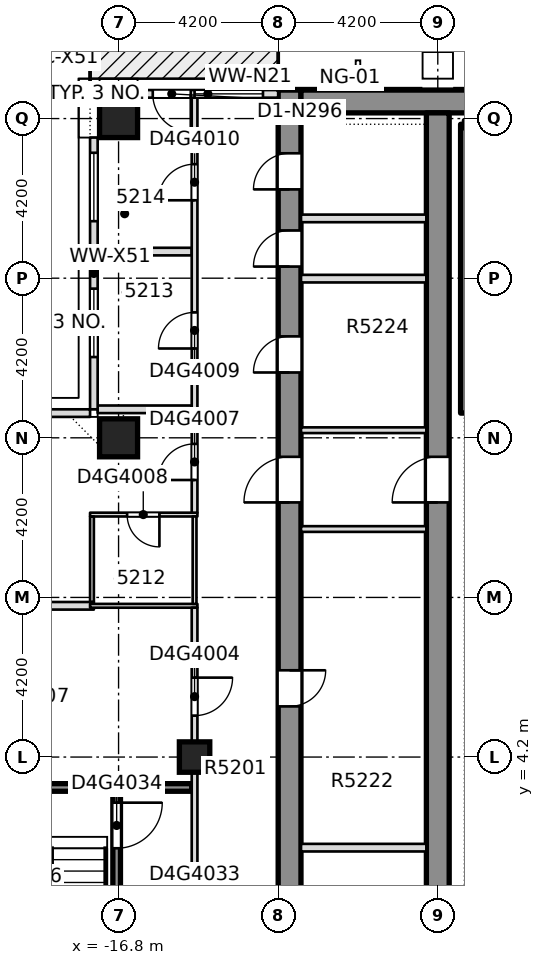
"""IFC4 building model, lengths in metres.
Left out: names, types, materials, properties, quantities, classifications, styles, units other than length and angle.
Written with IfcOpenShell. Run it as: python <this file> out.ifc"""

import sys

from ifc_helpers import new_model, si_unit, direction, frame, frame_2d, origin, origin_2d, place, context, subcontext, project, spatial, rectangle, extrude, element, fill, save


model = new_model("IFC4")
c1 = context("Model", 3, precision=1e-05, world=origin(), true_north=direction((0.0, 1.0)))
c2 = subcontext(c1, "Body", "Model", "MODEL_VIEW")
j1 = project(units=[si_unit("LENGTHUNIT", "METRE"), si_unit("PLANEANGLEUNIT", "RADIAN")], contexts=[c1])
p1 = place(None, origin())
s1 = spatial("IfcSite", under=j1, at=p1, CompositionType="ELEMENT")
p2 = place(p1, origin())
s2 = spatial("IfcBuilding", under=s1, at=p2, CompositionType="ELEMENT")
p3 = place(p2, frame((0.0, 0.0, 199.7)))
s3 = spatial("IfcBuildingStorey", under=s2, at=p3, CompositionType="ELEMENT", Elevation=199.7)
p4 = place(p3, frame((-12.3, -8.4, -0.4), z_axis=(0.0, 0.0, 1.0), x_axis=(0.0, 1.0, 0.0)))
e1 = element("IfcWall", 1, at=p4, inside=s3, PredefinedType="SHEAR", context=c2, shape_type="SweptSolid", body=[
    extrude(rectangle(XDim=30.15, YDim=0.6, at=frame_2d((15.075, 0.0))), origin(), (0.0, 0.0, 1.0), 3.45),
])
p5 = place(p4, frame((5.083, 0.0, 0.4)))
e2 = element("IfcOpeningElement", 2, at=p5, cuts=e1, PredefinedType="OPENING", context=c2, shape_type="SweptSolid", body=[
    extrude(rectangle(XDim=0.95, YDim=2.1, at=frame_2d((0.475, 1.05))), frame((0.0, 0.31, 0.0), z_axis=(0.0, -1.0, 0.0), x_axis=(1.0, 0.0, 0.0)), (0.0, 0.0, 1.0), 0.62),
])
p6 = place(p4, frame((13.933, 0.0, 0.4)))
e3 = element("IfcOpeningElement", 3, at=p6, cuts=e1, PredefinedType="OPENING", context=c2, shape_type="SweptSolid", body=[
    extrude(rectangle(XDim=0.95, YDim=2.1, at=frame_2d((0.475, 1.05))), frame((0.0, 0.31, 0.0), z_axis=(0.0, -1.0, 0.0), x_axis=(1.0, 0.0, 0.0)), (0.0, 0.0, 1.0), 0.62),
])
p7 = place(p4, frame((22.719, 0.0, 0.4)))
e4 = element("IfcOpeningElement", 4, at=p7, cuts=e1, PredefinedType="OPENING", context=c2, shape_type="SweptSolid", body=[
    extrude(rectangle(XDim=0.95, YDim=2.1, at=frame_2d((0.475, 1.05))), frame((0.0, 0.31, 0.0), z_axis=(0.0, -1.0, 0.0), x_axis=(1.0, 0.0, 0.0)), (0.0, 0.0, 1.0), 0.62),
])
p8 = place(p4, frame((25.506, 0.0, 0.4)))
e5 = element("IfcOpeningElement", 5, at=p8, cuts=e1, PredefinedType="OPENING", context=c2, shape_type="SweptSolid", body=[
    extrude(rectangle(XDim=0.95, YDim=2.1, at=frame_2d((0.475, 1.05))), frame((0.0, 0.31, 0.0), z_axis=(0.0, -1.0, 0.0), x_axis=(1.0, 0.0, 0.0)), (0.0, 0.0, 1.0), 0.62),
])
p9 = place(p4, frame((27.537, 0.0, 0.4)))
e6 = element("IfcOpeningElement", 6, at=p9, cuts=e1, PredefinedType="OPENING", context=c2, shape_type="SweptSolid", body=[
    extrude(rectangle(XDim=0.95, YDim=2.1, at=frame_2d((0.475, 1.05))), frame((0.0, 0.31, 0.0), z_axis=(0.0, -1.0, 0.0), x_axis=(1.0, 0.0, 0.0)), (0.0, 0.0, 1.0), 0.62),
])
p10 = place(p4, frame((19.3, 0.0, 0.4)))
e7 = element("IfcOpeningElement", 7, at=p10, cuts=e1, PredefinedType="OPENING", context=c2, shape_type="SweptSolid", body=[
    extrude(rectangle(XDim=1.2, YDim=2.1, at=frame_2d((0.6, 1.05))), frame((0.0, 0.31, 0.0), z_axis=(0.0, -1.0, 0.0), x_axis=(1.0, 0.0, 0.0)), (0.0, 0.0, 1.0), 0.62),
])
p11 = place(p3, frame((-12.0, 21.45, -0.4), z_axis=(0.0, 0.0, 1.0), x_axis=(1.0, 0.0, 0.0)))
e8 = element("IfcWall", 8, at=p11, inside=s3, PredefinedType="SHEAR", context=c2, shape_type="SweptSolid", body=[
    extrude(rectangle(XDim=24.0, YDim=0.6, at=frame_2d((12.0, 0.0))), origin(), (0.0, 0.0, 1.0), 3.45),
])
p12 = place(p3, frame((-8.4, -7.8, -0.4), z_axis=(0.0, 0.0, 1.0), x_axis=(0.0, 1.0, 0.0)))
e9 = element("IfcWall", 9, at=p12, inside=s3, PredefinedType="SHEAR", context=c2, shape_type="SweptSolid", body=[
    extrude(rectangle(XDim=28.95, YDim=0.6, at=frame_2d((14.475, 0.0))), origin(), (0.0, 0.0, 1.0), 3.45),
])
p13 = place(p12, frame((18.7, 0.0, 0.4)))
e10 = element("IfcOpeningElement", 10, at=p13, cuts=e9, PredefinedType="OPENING", context=c2, shape_type="SweptSolid", body=[
    extrude(rectangle(XDim=1.2, YDim=2.1, at=frame_2d((0.6, 1.05))), frame((0.0, 0.31, 0.0), z_axis=(0.0, -1.0, 0.0), x_axis=(1.0, 0.0, 0.0)), (0.0, 0.0, 1.0), 0.62),
])
for number, where, z_axis, x_axis in (
    (11, (-16.8, 12.6, -0.4), (0.0, 0.0, 1.0), (1.0, 0.0, 0.0)),
    (12, (-16.8, 21.0, -0.4), (0.0, 0.0, 1.0), (1.0, 0.0, 0.0)),
):
    element("IfcColumn", number, at=place(p3, frame(where, z_axis=z_axis, x_axis=x_axis)), inside=s3, PredefinedType="COLUMN", context=c2, shape_type="SweptSolid", body=[
        extrude(rectangle(XDim=1.0, YDim=1.0, at=origin_2d()), origin(), (0.0, 0.0, 1.0), 3.45),
    ])
p14 = place(p3, frame((-14.8, 4.2, -0.4), z_axis=(0.0, 0.0, 1.0), x_axis=(1.0, 0.0, 0.0)))
e13 = element("IfcColumn", 13, at=p14, inside=s3, PredefinedType="COLUMN", context=c2, shape_type="SweptSolid", body=[
    extrude(rectangle(XDim=0.8, YDim=0.8, at=origin_2d()), origin(), (0.0, 0.0, 1.0), 3.45),
])
p15 = place(p3, frame((-20.45, 3.4, 0.0), z_axis=(0.0, 0.0, 1.0), x_axis=(1.0, 0.0, 0.0)))
e14 = element("IfcWall", 14, at=p15, inside=s3, PredefinedType="SOLIDWALL", context=c2, shape_type="SweptSolid", body=[
    extrude(rectangle(XDim=5.575, YDim=0.2, at=frame_2d((2.788, 0.0))), origin(), (0.0, 0.0, 1.0), 3.05),
])
p16 = place(p3, frame((-25.75, 8.18, 0.0), z_axis=(0.0, 0.0, 1.0), x_axis=(1.0, 0.0, 0.0)))
e15 = element("IfcWall", 15, at=p16, inside=s3, PredefinedType="PARTITIONING", context=c2, shape_type="SweptSolid", body=[
    extrude(rectangle(XDim=8.3, YDim=0.2, at=frame_2d((4.15, 0.0))), origin(), (0.0, 0.0, 1.0), 3.05),
])
p17 = place(p3, frame((-17.55, 8.18, 0.0), z_axis=(0.0, 0.0, 1.0), x_axis=(1.0, 0.0, 0.0)))
e16 = element("IfcWall", 16, at=p17, inside=s3, PredefinedType="PARTITIONING", context=c2, shape_type="SweptSolid", body=[
    extrude(rectangle(XDim=2.825, YDim=0.1, at=frame_2d((1.413, 0.0))), origin(), (0.0, 0.0, 1.0), 3.05),
])
p18 = place(p3, frame((-17.55, 10.58, 0.0), z_axis=(0.0, 0.0, 1.0), x_axis=(1.0, 0.0, 0.0)))
e17 = element("IfcWall", 17, at=p18, inside=s3, PredefinedType="PARTITIONING", context=c2, shape_type="SweptSolid", body=[
    extrude(rectangle(XDim=2.825, YDim=0.1, at=frame_2d((1.413, 0.0))), origin(), (0.0, 0.0, 1.0), 3.05),
])
p19 = place(p18, frame((0.975, 0.0, 0.0)))
e18 = element("IfcOpeningElement", 18, at=p19, cuts=e17, PredefinedType="OPENING", context=c2, shape_type="SweptSolid", body=[
    extrude(rectangle(XDim=0.85, YDim=2.1, at=frame_2d((0.425, 1.05))), frame((0.0, 0.06, 0.0), z_axis=(0.0, -1.0, 0.0), x_axis=(1.0, 0.0, 0.0)), (0.0, 0.0, 1.0), 0.12),
])
for number, where, z_axis, x_axis in (
    (19, (-17.35, 13.35, 0.0), (0.0, 0.0, 1.0), (1.0, 0.0, 0.0)),
    (20, (-17.35, 17.5, 0.0), (0.0, 0.0, 1.0), (1.0, 0.0, 0.0)),
):
    element("IfcWall", number, at=place(p3, frame(where, z_axis=z_axis, x_axis=x_axis)), inside=s3, PredefinedType="PARTITIONING", context=c2, shape_type="SweptSolid", body=[
        extrude(rectangle(XDim=2.475, YDim=0.2, at=frame_2d((1.238, 0.0))), origin(), (0.0, 0.0, 1.0), 3.05),
    ])
p20 = place(p3, frame((-17.5, 8.28, 0.0), z_axis=(0.0, 0.0, 1.0), x_axis=(0.0, 1.0, 0.0)))
e21 = element("IfcWall", 21, at=p20, inside=s3, PredefinedType="PARTITIONING", context=c2, shape_type="SweptSolid", body=[
    extrude(rectangle(XDim=2.25, YDim=0.1, at=frame_2d((1.125, 0.0))), origin(), (0.0, 0.0, 1.0), 3.05),
])
p21 = place(p3, frame((-16.85, -3.3, 0.0), z_axis=(0.0, 0.0, 1.0), x_axis=(0.0, 1.0, 0.0)))
e22 = element("IfcWall", 22, at=p21, inside=s3, PredefinedType="SOLIDWALL", context=c2, shape_type="SweptSolid", body=[
    extrude(rectangle(XDim=6.6, YDim=0.2, at=frame_2d((3.3, 0.0))), origin(), (0.0, 0.0, 1.0), 3.05),
])
p22 = place(p21, frame((5.1, 0.0, 0.0)))
e23 = element("IfcOpeningElement", 23, at=p22, cuts=e22, PredefinedType="OPENING", context=c2, shape_type="SweptSolid", body=[
    extrude(rectangle(XDim=1.2, YDim=2.1, at=frame_2d((0.6, 1.05))), frame((0.0, 0.11, 0.0), z_axis=(0.0, -1.0, 0.0), x_axis=(1.0, 0.0, 0.0)), (0.0, 0.0, 1.0), 0.22),
])
p23 = place(p3, frame((-14.8, -10.45, 0.0), z_axis=(0.0, 0.0, 1.0), x_axis=(0.0, 1.0, 0.0)))
e24 = element("IfcWall", 24, at=p23, inside=s3, PredefinedType="PARTITIONING", context=c2, shape_type="SweptSolid", body=[
    extrude(rectangle(XDim=18.58, YDim=0.15, at=frame_2d((9.29, 0.0))), origin(), (0.0, 0.0, 1.0), 3.05),
])
p24 = place(p23, frame((0.9, 0.0, 0.0)))
e25 = element("IfcOpeningElement", 25, at=p24, cuts=e24, PredefinedType="OPENING", context=c2, shape_type="SweptSolid", body=[
    extrude(rectangle(XDim=0.95, YDim=2.1, at=frame_2d((0.475, 1.05))), frame((0.0, 0.085, 0.0), z_axis=(0.0, -1.0, 0.0), x_axis=(1.0, 0.0, 0.0)), (0.0, 0.0, 1.0), 0.17),
])
p25 = place(p23, frame((15.74, 0.0, 0.0)))
e26 = element("IfcOpeningElement", 26, at=p25, cuts=e24, PredefinedType="OPENING", context=c2, shape_type="SweptSolid", body=[
    extrude(rectangle(XDim=1.0, YDim=2.1, at=frame_2d((0.5, 1.05))), frame((0.0, 0.085, 0.0), z_axis=(0.0, -1.0, 0.0), x_axis=(1.0, 0.0, 0.0)), (0.0, 0.0, 1.0), 0.17),
])
p26 = place(p23, frame((9.9, 0.0, 0.0)))
e27 = element("IfcOpeningElement", 27, at=p26, cuts=e24, PredefinedType="OPENING", context=c2, shape_type="SweptSolid", body=[
    extrude(rectangle(XDim=1.1, YDim=2.1, at=frame_2d((0.55, 1.05))), frame((0.0, 0.085, 0.0), z_axis=(0.0, -1.0, 0.0), x_axis=(1.0, 0.0, 0.0)), (0.0, 0.0, 1.0), 0.17),
])
p27 = place(p23, frame((4.75, 0.0, 0.0)))
e28 = element("IfcOpeningElement", 28, at=p27, cuts=e24, PredefinedType="OPENING", context=c2, shape_type="SweptSolid", body=[
    extrude(rectangle(XDim=1.0, YDim=2.1, at=frame_2d((0.5, 1.05))), frame((0.0, 0.085, 0.0), z_axis=(0.0, -1.0, 0.0), x_axis=(1.0, 0.0, 0.0)), (0.0, 0.0, 1.0), 0.17),
])
p28 = place(p3, frame((-14.8, 8.23, 0.0), z_axis=(0.0, 0.0, 1.0), x_axis=(0.0, 1.0, 0.0)))
e29 = element("IfcWall", 29, at=p28, inside=s3, PredefinedType="PARTITIONING", context=c2, shape_type="SweptSolid", body=[
    extrude(rectangle(XDim=2.3, YDim=0.1, at=frame_2d((1.15, 0.0))), origin(), (0.0, 0.0, 1.0), 3.05),
])
p29 = place(p3, frame((-14.8, 10.63, 0.0), z_axis=(0.0, 0.0, 1.0), x_axis=(0.0, 1.0, 0.0)))
e30 = element("IfcWall", 30, at=p29, inside=s3, PredefinedType="PARTITIONING", context=c2, shape_type="SweptSolid", body=[
    extrude(rectangle(XDim=10.92, YDim=0.15, at=frame_2d((5.46, 0.0))), origin(), (0.0, 0.0, 1.0), 3.05),
])
p30 = place(p29, frame((0.86, 0.0, 0.0)))
e31 = element("IfcOpeningElement", 31, at=p30, cuts=e30, PredefinedType="OPENING", context=c2, shape_type="SweptSolid", body=[
    extrude(rectangle(XDim=0.95, YDim=2.1, at=frame_2d((0.475, 1.05))), frame((0.0, 0.085, 0.0), z_axis=(0.0, -1.0, 0.0), x_axis=(1.0, 0.0, 0.0)), (0.0, 0.0, 1.0), 0.17),
])
p31 = place(p29, frame((4.32, 0.0, 0.0)))
e32 = element("IfcOpeningElement", 32, at=p31, cuts=e30, PredefinedType="OPENING", context=c2, shape_type="SweptSolid", body=[
    extrude(rectangle(XDim=0.95, YDim=2.1, at=frame_2d((0.475, 1.05))), frame((0.0, 0.085, 0.0), z_axis=(0.0, -1.0, 0.0), x_axis=(1.0, 0.0, 0.0)), (0.0, 0.0, 1.0), 0.17),
])
p32 = place(p29, frame((8.22, 0.0, 0.0)))
e33 = element("IfcOpeningElement", 33, at=p32, cuts=e30, PredefinedType="OPENING", context=c2, shape_type="SweptSolid", body=[
    extrude(rectangle(XDim=0.95, YDim=2.1, at=frame_2d((0.475, 1.05))), frame((0.0, 0.085, 0.0), z_axis=(0.0, -1.0, 0.0), x_axis=(1.0, 0.0, 0.0)), (0.0, 0.0, 1.0), 0.17),
])
p33 = place(p3, frame((-12.6, 21.65, 0.0), z_axis=(0.0, 0.0, 1.0), x_axis=(-1.0, 0.0, 0.0)))
e34 = element("IfcWall", 34, at=p33, inside=s3, PredefinedType="STANDARD", context=c2, shape_type="SweptSolid", body=[
    extrude(rectangle(XDim=3.7, YDim=0.2, at=frame_2d((1.85, 0.0))), origin(), (0.0, 0.0, 1.0), 3.05),
])
p34 = place(p33, frame((0.4, 0.0, 0.2)))
e35 = element("IfcOpeningElement", 35, at=p34, cuts=e34, PredefinedType="OPENING", context=c2, shape_type="SweptSolid", body=[
    extrude(rectangle(XDim=1.8, YDim=2.65, at=frame_2d((0.9, 1.325))), frame((0.0, 0.11, 0.0), z_axis=(0.0, -1.0, 0.0), x_axis=(1.0, 0.0, 0.0)), (0.0, 0.0, 1.0), 0.22),
])
p35 = place(p33, frame((2.3, 0.0, 0.0)))
e36 = element("IfcOpeningElement", 36, at=p35, cuts=e34, PredefinedType="OPENING", context=c2, shape_type="SweptSolid", body=[
    extrude(rectangle(XDim=1.0, YDim=2.4, at=frame_2d((0.5, 1.2))), frame((0.0, 0.11, 0.0), z_axis=(0.0, -1.0, 0.0), x_axis=(1.0, 0.0, 0.0)), (0.0, 0.0, 1.0), 0.22),
])
p36 = place(p3, frame((-17.45, 20.5, 0.0), z_axis=(0.0, 0.0, 1.0), x_axis=(0.0, -1.0, 0.0)))
e37 = element("IfcWall", 37, at=p36, inside=s3, PredefinedType="STANDARD", context=c2, shape_type="SweptSolid", body=[
    extrude(rectangle(XDim=7.15, YDim=0.2, at=frame_2d((3.575, 0.0))), origin(), (0.0, 0.0, 1.0), 3.05),
])
p37 = place(p36, frame((3.975, 0.0, 0.2)))
e38 = element("IfcOpeningElement", 38, at=p37, cuts=e37, PredefinedType="OPENING", context=c2, shape_type="SweptSolid", body=[
    extrude(rectangle(XDim=1.8, YDim=2.65, at=frame_2d((0.9, 1.325))), frame((0.0, 0.11, 0.0), z_axis=(0.0, -1.0, 0.0), x_axis=(1.0, 0.0, 0.0)), (0.0, 0.0, 1.0), 0.22),
])
p38 = place(p36, frame((0.4, 0.0, 0.2)))
e39 = element("IfcOpeningElement", 39, at=p38, cuts=e37, PredefinedType="OPENING", context=c2, shape_type="SweptSolid", body=[
    extrude(rectangle(XDim=1.8, YDim=2.65, at=frame_2d((0.9, 1.325))), frame((0.0, 0.11, 0.0), z_axis=(0.0, -1.0, 0.0), x_axis=(1.0, 0.0, 0.0)), (0.0, 0.0, 1.0), 0.22),
])
p39 = place(p3, frame((-17.55, 13.25, 0.0), z_axis=(0.0, 0.0, 1.0), x_axis=(-1.0, 0.0, 0.0)))
e40 = element("IfcWall", 40, at=p39, inside=s3, PredefinedType="STANDARD", context=c2, shape_type="SweptSolid", body=[
    extrude(rectangle(XDim=7.15, YDim=0.2, at=frame_2d((3.575, 0.0))), origin(), (0.0, 0.0, 1.0), 3.05),
])
p40 = place(p3, frame((-11.999, 1.816, 0.0), z_axis=(0.0, 0.0, 1.0), x_axis=(1.0, 0.0, 0.0)))
e41 = element("IfcWall", 41, at=p40, inside=s3, PredefinedType="PARTITIONING", context=c2, shape_type="SweptSolid", body=[
    extrude(rectangle(XDim=3.298, YDim=0.2, at=frame_2d((1.649, 0.0))), origin(), (0.0, 0.0, 1.0), 3.05),
])
for number, where, z_axis, x_axis in (
    (42, (-11.999, 10.2, 0.0), (0.0, 0.0, 1.0), (1.0, 0.0, 0.0)),
    (43, (-11.999, 12.8, 0.0), (0.0, 0.0, 1.0), (1.0, 0.0, 0.0)),
):
    element("IfcWall", number, at=place(p3, frame(where, z_axis=z_axis, x_axis=x_axis)), inside=s3, PredefinedType="PARTITIONING", context=c2, shape_type="SweptSolid", body=[
        extrude(rectangle(XDim=3.298, YDim=0.15, at=frame_2d((1.649, 0.0))), origin(), (0.0, 0.0, 1.0), 3.05),
    ])
for number, where, z_axis, x_axis in (
    (44, (-11.999, 16.788, 0.0), (0.0, 0.0, 1.0), (1.0, 0.0, 0.0)),
    (45, (-11.999, 18.373, 0.0), (0.0, 0.0, 1.0), (1.0, 0.0, 0.0)),
):
    element("IfcWall", number, at=place(p3, frame(where, z_axis=z_axis, x_axis=x_axis)), inside=s3, PredefinedType="PARTITIONING", context=c2, shape_type="SweptSolid", body=[
        extrude(rectangle(XDim=3.298, YDim=0.2, at=frame_2d((1.649, 0.0))), origin(), (0.0, 0.0, 1.0), 3.05),
    ])
p41 = place(p3, frame((-7.7, 13.25, 0.0), z_axis=(0.0, 0.0, 1.0), x_axis=(0.0, 1.0, 0.0)))
e46 = element("IfcWall", 46, at=p41, inside=s3, PredefinedType="SOLIDWALL", context=c2, shape_type="SweptSolid", body=[
    extrude(rectangle(XDim=7.6, YDim=0.2, at=frame_2d((3.8, 0.0))), origin(), (0.0, 0.0, 1.0), 3.05),
])
p42 = place(p3, frame((-7.7, 20.85, 0.0), z_axis=(0.0, 0.0, 1.0), x_axis=(1.0, 0.0, 0.0)))
e47 = element("IfcWall", 47, at=p42, inside=s3, PredefinedType="SOLIDWALL", context=c2, shape_type="SweptSolid", body=[
    extrude(rectangle(XDim=3.55, YDim=0.2, at=frame_2d((1.775, 0.0))), origin(), (0.0, 0.0, 1.0), 3.05),
])
p43 = place(p25, origin())
e48 = element("IfcDoor", 48, at=p43, inside=s3, OperationType="SINGLE_SWING_RIGHT", PredefinedType="DOOR", context=c2, shape_type="SweptSolid", body=[
    extrude(rectangle(XDim=1.0, YDim=2.1, at=frame_2d((0.5, 1.05))), frame((0.0, 0.025, 0.0), z_axis=(0.0, -1.0, 0.0), x_axis=(1.0, 0.0, 0.0)), (0.0, 0.0, 1.0), 0.05),
])
fill(e26, e48)
p44 = place(p30, origin())
e49 = element("IfcDoor", 49, at=p44, inside=s3, OperationType="SINGLE_SWING_LEFT", PredefinedType="DOOR", context=c2, shape_type="SweptSolid", body=[
    extrude(rectangle(XDim=0.95, YDim=2.1, at=frame_2d((0.475, 1.05))), frame((0.0, 0.025, 0.0), z_axis=(0.0, -1.0, 0.0), x_axis=(1.0, 0.0, 0.0)), (0.0, 0.0, 1.0), 0.05),
])
fill(e31, e49)
p45 = place(p19, origin())
e50 = element("IfcDoor", 50, at=p45, inside=s3, OperationType="SINGLE_SWING_RIGHT", PredefinedType="DOOR", context=c2, shape_type="SweptSolid", body=[
    extrude(rectangle(XDim=0.85, YDim=2.1, at=frame_2d((0.425, 1.05))), frame((0.0, 0.025, 0.0), z_axis=(0.0, -1.0, 0.0), x_axis=(1.0, 0.0, 0.0)), (0.0, 0.0, 1.0), 0.05),
])
fill(e18, e50)
p46 = place(p31, origin())
e51 = element("IfcDoor", 51, at=p46, inside=s3, OperationType="SINGLE_SWING_LEFT", PredefinedType="DOOR", context=c2, shape_type="SweptSolid", body=[
    extrude(rectangle(XDim=0.95, YDim=2.1, at=frame_2d((0.475, 1.05))), frame((0.0, 0.025, 0.0), z_axis=(0.0, -1.0, 0.0), x_axis=(1.0, 0.0, 0.0)), (0.0, 0.0, 1.0), 0.05),
])
fill(e32, e51)
p47 = place(p32, origin())
e52 = element("IfcDoor", 52, at=p47, inside=s3, OperationType="SINGLE_SWING_RIGHT", PredefinedType="DOOR", context=c2, shape_type="SweptSolid", body=[
    extrude(rectangle(XDim=0.95, YDim=2.1, at=frame_2d((0.475, 1.05))), frame((0.0, 0.025, 0.0), z_axis=(0.0, -1.0, 0.0), x_axis=(1.0, 0.0, 0.0)), (0.0, 0.0, 1.0), 0.05),
])
fill(e33, e52)
p48 = place(p22, origin())
e53 = element("IfcDoor", 53, at=p48, inside=s3, OperationType="SINGLE_SWING_RIGHT", PredefinedType="DOOR", context=c2, shape_type="SweptSolid", body=[
    extrude(rectangle(XDim=1.2, YDim=2.1, at=frame_2d((0.6, 1.05))), frame((0.0, 0.025, 0.0), z_axis=(0.0, -1.0, 0.0), x_axis=(1.0, 0.0, 0.0)), (0.0, 0.0, 1.0), 0.05),
])
fill(e23, e53)
p49 = place(p34, origin())
e54 = element("IfcWindow", 54, at=p49, inside=s3, PartitioningType="SINGLE_PANEL", PredefinedType="WINDOW", context=c2, shape_type="SweptSolid", body=[
    extrude(rectangle(XDim=1.8, YDim=2.65, at=frame_2d((0.9, 1.325))), frame((0.0, 0.03, 0.0), z_axis=(0.0, -1.0, 0.0), x_axis=(1.0, 0.0, 0.0)), (0.0, 0.0, 1.0), 0.06),
])
fill(e35, e54)
p50 = place(p35, origin())
e55 = element("IfcDoor", 55, at=p50, inside=s3, OperationType="SINGLE_SWING_LEFT", PredefinedType="DOOR", context=c2, shape_type="SweptSolid", body=[
    extrude(rectangle(XDim=1.0, YDim=2.4, at=frame_2d((0.5, 1.2))), frame((0.0, 0.025, 0.0), z_axis=(0.0, -1.0, 0.0), x_axis=(1.0, 0.0, 0.0)), (0.0, 0.0, 1.0), 0.05),
])
fill(e36, e55)
p51 = place(p37, origin())
e56 = element("IfcWindow", 56, at=p51, inside=s3, PartitioningType="SINGLE_PANEL", PredefinedType="WINDOW", context=c2, shape_type="SweptSolid", body=[
    extrude(rectangle(XDim=1.8, YDim=2.65, at=frame_2d((0.9, 1.325))), frame((0.0, 0.03, 0.0), z_axis=(0.0, -1.0, 0.0), x_axis=(1.0, 0.0, 0.0)), (0.0, 0.0, 1.0), 0.06),
])
fill(e38, e56)
p52 = place(p38, origin())
e57 = element("IfcWindow", 57, at=p52, inside=s3, PartitioningType="SINGLE_PANEL", PredefinedType="WINDOW", context=c2, shape_type="SweptSolid", body=[
    extrude(rectangle(XDim=1.8, YDim=2.65, at=frame_2d((0.9, 1.325))), frame((0.0, 0.03, 0.0), z_axis=(0.0, -1.0, 0.0), x_axis=(1.0, 0.0, 0.0)), (0.0, 0.0, 1.0), 0.06),
])
fill(e39, e57)
p53 = place(p6, origin())
e58 = element("IfcDoor", 58, at=p53, inside=s3, OperationType="SINGLE_SWING_LEFT", PredefinedType="DOOR", context=c2, shape_type="SweptSolid", body=[
    extrude(rectangle(XDim=0.95, YDim=2.1, at=frame_2d((0.475, 1.05))), frame((0.0, 0.025, 0.0), z_axis=(0.0, -1.0, 0.0), x_axis=(1.0, 0.0, 0.0)), (0.0, 0.0, 1.0), 0.05),
])
fill(e3, e58)
p54 = place(p7, origin())
e59 = element("IfcDoor", 59, at=p54, inside=s3, OperationType="SINGLE_SWING_LEFT", PredefinedType="DOOR", context=c2, shape_type="SweptSolid", body=[
    extrude(rectangle(XDim=0.95, YDim=2.1, at=frame_2d((0.475, 1.05))), frame((0.0, 0.025, 0.0), z_axis=(0.0, -1.0, 0.0), x_axis=(1.0, 0.0, 0.0)), (0.0, 0.0, 1.0), 0.05),
])
fill(e4, e59)
p55 = place(p8, origin())
e60 = element("IfcDoor", 60, at=p55, inside=s3, OperationType="SINGLE_SWING_LEFT", PredefinedType="DOOR", context=c2, shape_type="SweptSolid", body=[
    extrude(rectangle(XDim=0.95, YDim=2.1, at=frame_2d((0.475, 1.05))), frame((0.0, 0.025, 0.0), z_axis=(0.0, -1.0, 0.0), x_axis=(1.0, 0.0, 0.0)), (0.0, 0.0, 1.0), 0.05),
])
fill(e5, e60)
p56 = place(p9, origin())
e61 = element("IfcDoor", 61, at=p56, inside=s3, OperationType="SINGLE_SWING_LEFT", PredefinedType="DOOR", context=c2, shape_type="SweptSolid", body=[
    extrude(rectangle(XDim=0.95, YDim=2.1, at=frame_2d((0.475, 1.05))), frame((0.0, 0.025, 0.0), z_axis=(0.0, -1.0, 0.0), x_axis=(1.0, 0.0, 0.0)), (0.0, 0.0, 1.0), 0.05),
])
fill(e6, e61)
p57 = place(p10, origin())
e62 = element("IfcDoor", 62, at=p57, inside=s3, OperationType="SINGLE_SWING_LEFT", PredefinedType="DOOR", context=c2, shape_type="SweptSolid", body=[
    extrude(rectangle(XDim=1.2, YDim=2.1, at=frame_2d((0.6, 1.05))), frame((0.0, 0.025, 0.0), z_axis=(0.0, -1.0, 0.0), x_axis=(1.0, 0.0, 0.0)), (0.0, 0.0, 1.0), 0.05),
])
fill(e7, e62)
p58 = place(p13, origin())
e63 = element("IfcDoor", 63, at=p58, inside=s3, OperationType="SINGLE_SWING_LEFT", PredefinedType="DOOR", context=c2, shape_type="SweptSolid", body=[
    extrude(rectangle(XDim=1.2, YDim=2.1, at=frame_2d((0.6, 1.05))), frame((0.0, 0.025, 0.0), z_axis=(0.0, -1.0, 0.0), x_axis=(1.0, 0.0, 0.0)), (0.0, 0.0, 1.0), 0.05),
])
fill(e10, e63)
save(model, sys.argv[1])
